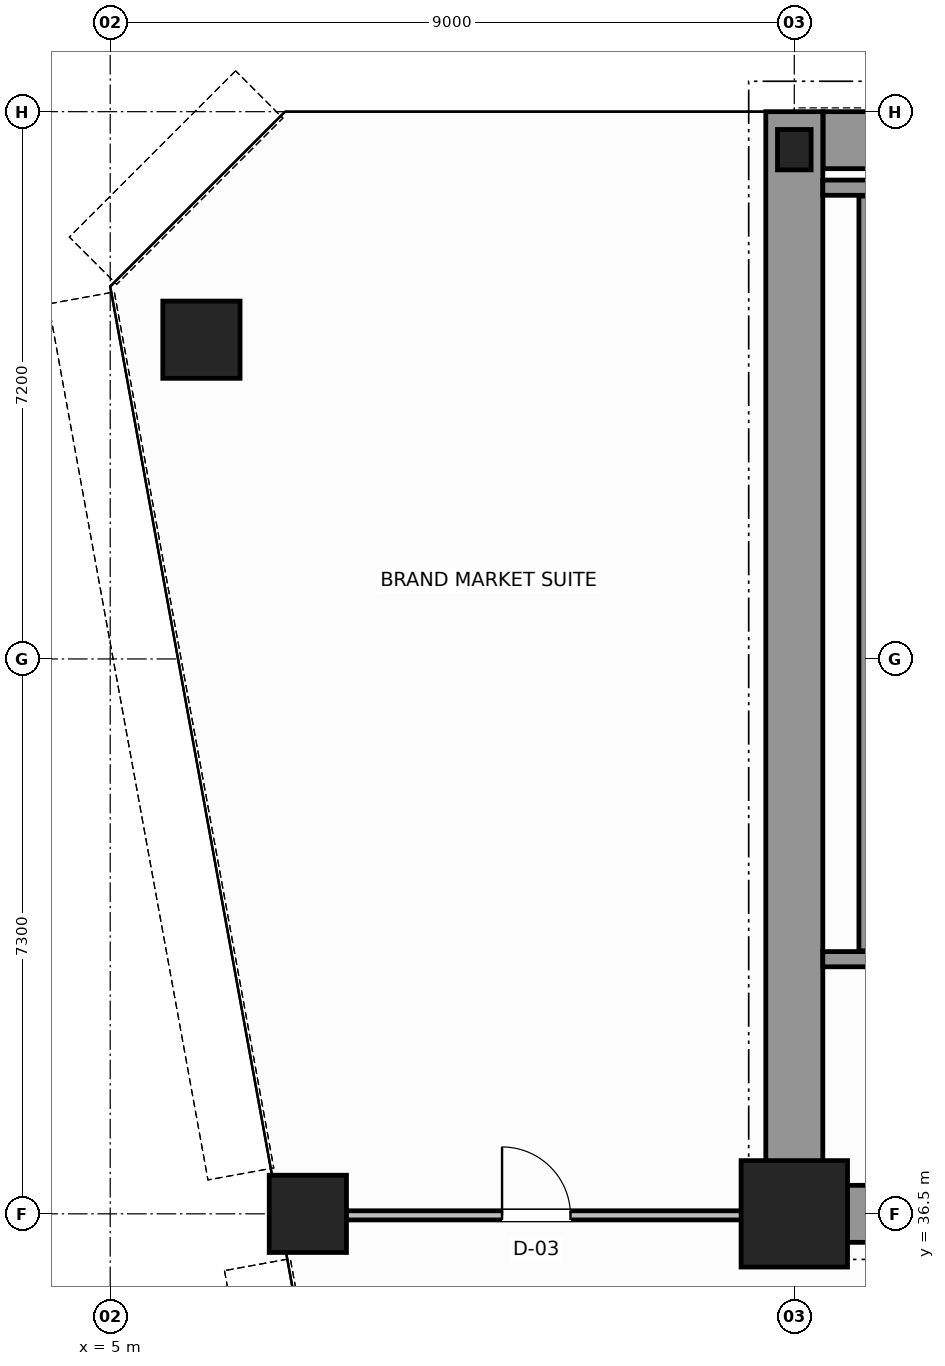
"""IFC4 building model, lengths in metres.
Left out: names, types, materials, properties, quantities, classifications, styles, units other than length and angle.
Written with IfcOpenShell. Run it as: python <this file> out.ifc"""

import sys

from ifc_helpers import new_model, si_unit, direction, frame, frame_2d, origin, origin_2d, place, context, subcontext, project, spatial, rectangle, hollow_circle, i_section, extrude, source, transform, mapped, element, fill, save


model = new_model("IFC4")
c1 = context("Model", 3, precision=1e-05, world=origin(), true_north=direction((0.0, 1.0)))
c2 = subcontext(c1, "Body", "Model", "MODEL_VIEW")
j1 = project(units=[si_unit("LENGTHUNIT", "METRE"), si_unit("PLANEANGLEUNIT", "RADIAN")], contexts=[c1])
p1 = place(None, origin())
s1 = spatial("IfcSite", under=j1, at=p1, CompositionType="ELEMENT")
p2 = place(p1, origin())
s2 = spatial("IfcBuilding", under=s1, at=p2, CompositionType="ELEMENT")
p3 = place(p2, frame((0.0, 0.0, 114.8)))
s3 = spatial("IfcBuildingStorey", under=s2, at=p3, CompositionType="ELEMENT", Elevation=114.8)
m1 = source(origin(), c2, "Body", "SweptSolid", [
    extrude(rectangle(XDim=1.4, YDim=1.4, at=origin_2d()), origin(), (0.0, 0.0, 1.0), 3.8),
])
p4 = place(p3, frame((14.0, 36.5, 0.0), z_axis=(0.0, 0.0, 1.0), x_axis=(1.0, 0.0, 0.0)))
e1 = element("IfcColumn", 1, at=p4, inside=s3, PredefinedType="COLUMN", context=c2, shape_type="MappedRepresentation", body=[
    mapped(m1, transform((0.0, 0.0, 0.0), scale=1.0)),
])
m2 = source(origin(), c2, "Body", "SweptSolid", [
    extrude(i_section(OverallWidth=0.442, OverallDepth=0.531, WebThickness=0.065, FlangeThickness=0.076, FilletRadius=0.015, at=origin_2d()), origin(), (0.0, 0.0, 1.0), 3.8),
])
p5 = place(p3, frame((14.0, 50.5, 0.0), z_axis=(0.0, 0.0, 1.0), x_axis=(1.0, 0.0, 0.0)))
e2 = element("IfcColumn", 2, at=p5, inside=s3, PredefinedType="COLUMN", context=c2, shape_type="MappedRepresentation", body=[
    mapped(m2, transform((0.0, 0.0, 0.0), scale=1.0)),
])
m3 = source(origin(), c2, "Body", "SweptSolid", [
    extrude(hollow_circle(Radius=0.508, WallThickness=0.045, at=origin_2d()), origin(), (0.0, 0.0, 1.0), 3.8),
])
for number, where, z_axis, x_axis in (
    (3, (6.2, 48.0, 0.0), (0.0, 0.0, 1.0), (1.0, 0.0, 0.0)),
    (4, (7.6, 36.5, 0.0), (0.0, 0.0, 1.0), (1.0, 0.0, 0.0)),
):
    element("IfcColumn", number, at=place(p3, frame(where, z_axis=z_axis, x_axis=x_axis)), inside=s3, PredefinedType="COLUMN", context=c2, shape_type="MappedRepresentation", body=[
        mapped(m3, transform((0.0, 0.0, 0.0), scale=1.0)),
    ])
p6 = place(p3, frame((14.379, 50.625, 0.0), z_axis=(0.0, 0.0, 1.0), x_axis=(1.0, 0.0, 0.0)))
e5 = element("IfcWall", 5, at=p6, inside=s3, PredefinedType="SHEAR", context=c2, shape_type="SweptSolid", body=[
    extrude(rectangle(XDim=19.619, YDim=0.75, at=frame_2d((9.81, 0.0))), origin(), (0.0, 0.0, 1.0), 3.8),
])
p7 = place(p3, frame((14.0, 36.5, 0.0), z_axis=(0.0, 0.0, 1.0), x_axis=(0.0, 1.0, 0.0)))
e6 = element("IfcWall", 6, at=p7, inside=s3, PredefinedType="SHEAR", context=c2, shape_type="SweptSolid", body=[
    extrude(rectangle(XDim=14.5, YDim=0.75, at=frame_2d((7.25, 0.0))), origin(), (0.0, 0.0, 1.0), 3.8),
])
p8 = place(p3, frame((14.395, 36.5, 0.0), z_axis=(0.0, 0.0, 1.0), x_axis=(1.0, 0.0, 0.0)))
e7 = element("IfcWall", 7, at=p8, inside=s3, PredefinedType="SHEAR", context=c2, shape_type="SweptSolid", body=[
    extrude(rectangle(XDim=3.805, YDim=0.75, at=frame_2d((1.902, 0.0))), origin(), (0.0, 0.0, 1.0), 2.38),
])
p9 = place(p3, frame((14.375, 39.85, 0.0), z_axis=(0.0, 0.0, 1.0), x_axis=(1.0, 0.0, 0.0)))
e8 = element("IfcWall", 8, at=p9, inside=s3, PredefinedType="SOLIDWALL", context=c2, shape_type="SweptSolid", body=[
    extrude(rectangle(XDim=4.225, YDim=0.2, at=frame_2d((2.113, 0.0))), origin(), (0.0, 0.0, 1.0), 3.8),
])
p10 = place(p9, frame((1.8, 0.0, 0.0)))
e9 = element("IfcOpeningElement", 9, at=p10, cuts=e8, PredefinedType="OPENING", context=c2, shape_type="SweptSolid", body=[
    extrude(rectangle(XDim=1.1, YDim=2.15, at=frame_2d((0.55, 1.075))), frame((0.0, 0.11, 0.0), z_axis=(0.0, -1.0, 0.0), x_axis=(1.0, 0.0, 0.0)), (0.0, 0.0, 1.0), 0.22),
])
p11 = place(p3, frame((14.375, 50.0, 0.0), z_axis=(0.0, 0.0, 1.0), x_axis=(1.0, 0.0, 0.0)))
e10 = element("IfcWall", 10, at=p11, inside=s3, PredefinedType="SOLIDWALL", context=c2, shape_type="SweptSolid", body=[
    extrude(rectangle(XDim=4.225, YDim=0.2, at=frame_2d((2.113, 0.0))), origin(), (0.0, 0.0, 1.0), 3.8),
])
p12 = place(p3, frame((14.95, 39.96, 0.0), z_axis=(0.0, 0.0, 1.0), x_axis=(0.0, 1.0, 0.0)))
e11 = element("IfcWall", 11, at=p12, inside=s3, PredefinedType="SOLIDWALL", context=c2, shape_type="SweptSolid", body=[
    extrude(rectangle(XDim=9.93, YDim=0.2, at=frame_2d((4.965, 0.0))), origin(), (0.0, 0.0, 1.0), 3.8),
])
p13 = place(p3, frame((7.27, 36.48, 0.0), z_axis=(0.0, 0.0, 1.0), x_axis=(1.0, 0.0, 0.0)))
e12 = element("IfcWall", 12, at=p13, inside=s3, PredefinedType="PARTITIONING", context=c2, shape_type="SweptSolid", body=[
    extrude(rectangle(XDim=6.67, YDim=0.12, at=frame_2d((3.335, 0.0))), origin(), (0.0, 0.0, 1.0), 2.87),
])
p14 = place(p13, frame((2.885, 0.0, 0.0)))
e13 = element("IfcOpeningElement", 13, at=p14, cuts=e12, PredefinedType="OPENING", context=c2, shape_type="SweptSolid", body=[
    extrude(rectangle(XDim=0.9, YDim=2.15, at=frame_2d((0.45, 1.075))), frame((0.0, 0.07, 0.0), z_axis=(0.0, -1.0, 0.0), x_axis=(1.0, 0.0, 0.0)), (0.0, 0.0, 1.0), 0.14),
])
m4 = source(origin(), c2, "Body", "SweptSolid", [
    extrude(rectangle(XDim=0.9, YDim=2.15, at=frame_2d((0.45, 1.075))), frame((0.0, 0.025, 0.0), z_axis=(0.0, -1.0, 0.0), x_axis=(1.0, 0.0, 0.0)), (0.0, 0.0, 1.0), 0.05),
])
p15 = place(p14, origin())
e14 = element("IfcDoor", 14, at=p15, inside=s3, OperationType="SINGLE_SWING_LEFT", PredefinedType="DOOR", context=c2, shape_type="MappedRepresentation", body=[
    mapped(m4, transform((0.0, 0.0, 0.0), scale=1.0)),
])
fill(e13, e14)
save(model, sys.argv[1])
